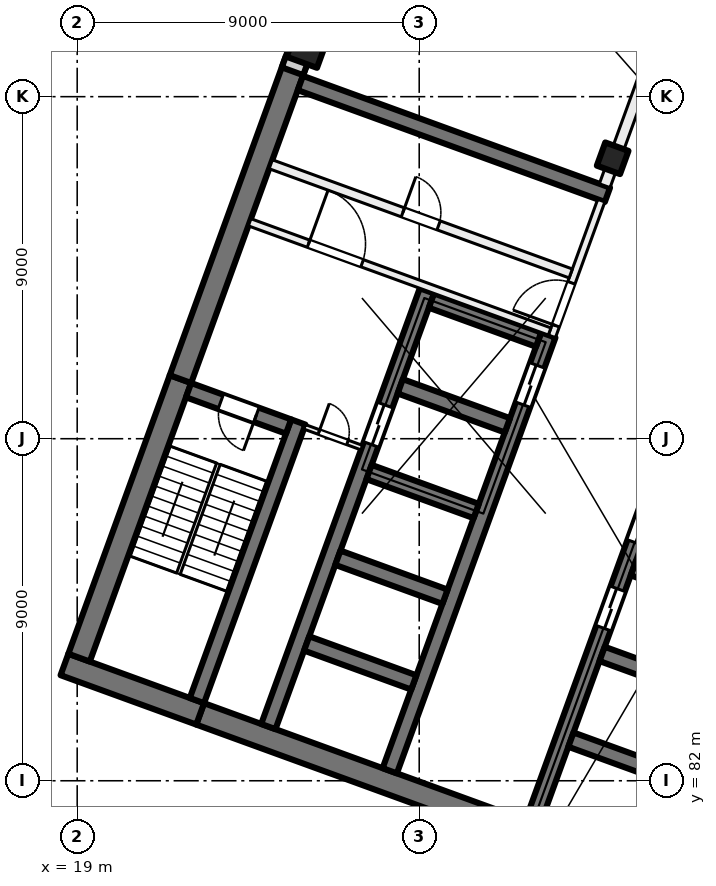
"""IFC4 building model, lengths in metres.
Left out: names, types, materials, properties, quantities, classifications, styles, units other than length and angle.
Written with IfcOpenShell. Run it as: python <this file> out.ifc"""

import sys

from ifc_helpers import new_model, si_unit, direction, frame, frame_2d, origin, origin_2d, place, context, subcontext, project, spatial, rectangle, extrude, element, fill, save


model = new_model("IFC4")
c1 = context("Model", 3, precision=1e-05, world=origin(), true_north=direction((0.0, 1.0)))
c2 = subcontext(c1, "Body", "Model", "MODEL_VIEW")
j1 = project(units=[si_unit("LENGTHUNIT", "METRE"), si_unit("PLANEANGLEUNIT", "RADIAN")], contexts=[c1])
p1 = place(None, origin())
s1 = spatial("IfcSite", under=j1, at=p1, CompositionType="ELEMENT")
p2 = place(p1, origin())
s2 = spatial("IfcBuilding", under=s1, at=p2, CompositionType="ELEMENT")
p3 = place(p2, frame((0.0, 0.0, 125.0)))
s3 = spatial("IfcBuildingStorey", under=s2, at=p3, CompositionType="ELEMENT", Elevation=125.0)
p4 = place(p3, frame((33.091, 98.379, 0.0), z_axis=(0.0, 0.0, 1.0), x_axis=(-0.342020143326, -0.939692620786, 0.0)))
e1 = element("IfcColumn", 1, at=p4, inside=s3, PredefinedType="COLUMN", context=c2, shape_type="SweptSolid", body=[
    extrude(rectangle(XDim=0.65, YDim=0.65, at=origin_2d()), origin(), (0.0, 0.0, 1.0), 4.0),
])
p5 = place(p3, frame((25.056, 101.303, 0.0), z_axis=(0.0, 0.0, 1.0), x_axis=(-0.342020143326, -0.939692620786, 0.0)))
e2 = element("IfcColumn", 2, at=p5, inside=s3, PredefinedType="COLUMN", context=c2, shape_type="SweptSolid", body=[
    extrude(rectangle(XDim=0.85, YDim=0.85, at=origin_2d()), origin(), (0.0, 0.0, 1.0), 4.0),
])
p6 = place(p3, frame((35.767, 78.835, 0.0), z_axis=(0.0, 0.0, 1.0), x_axis=(-0.939692894512, 0.342019391267, 0.0)))
e3 = element("IfcWall", 3, at=p6, inside=s3, PredefinedType="SHEAR", context=c2, shape_type="SweptSolid", body=[
    extrude(rectangle(XDim=14.4, YDim=0.6, at=frame_2d((7.2, 0.0))), origin(), (0.0, 0.0, 1.0), 4.0),
])
p7 = place(p3, frame((22.236, 83.76, 0.0), z_axis=(0.0, 0.0, 1.0), x_axis=(-0.939680822529, 0.342052557032, 0.0)))
e4 = element("IfcWall", 4, at=p7, inside=s3, PredefinedType="SHEAR", context=c2, shape_type="SweptSolid", body=[
    extrude(rectangle(XDim=3.8, YDim=0.6, at=frame_2d((1.9, 0.0))), origin(), (0.0, 0.0, 1.0), 4.0),
])
p8 = place(p3, frame((19.05, 85.239, 0.0), z_axis=(0.0, 0.0, 1.0), x_axis=(0.342016982193, 0.939693771338, 0.0)))
e5 = element("IfcWall", 5, at=p8, inside=s3, PredefinedType="SHEAR", context=c2, shape_type="SweptSolid", body=[
    extrude(rectangle(XDim=7.8, YDim=0.6, at=frame_2d((3.9, 0.0))), origin(), (0.0, 0.0, 1.0), 4.0),
])
p9 = place(p3, frame((21.717, 92.568, 0.0), z_axis=(0.0, 0.0, 1.0), x_axis=(0.342017595281, 0.939693548195, 0.0)))
e6 = element("IfcWall", 6, at=p9, inside=s3, PredefinedType="SHEAR", context=c2, shape_type="SweptSolid", body=[
    extrude(rectangle(XDim=8.925, YDim=0.6, at=frame_2d((4.462, 0.0))), origin(), (0.0, 0.0, 1.0), 4.0),
])
p10 = place(p3, frame((22.15, 84.11, 0.0), z_axis=(0.0, 0.0, 1.0), x_axis=(0.342016982193, 0.939693771338, 0.0)))
e7 = element("IfcWall", 7, at=p10, inside=s3, PredefinedType="SHEAR", context=c2, shape_type="SweptSolid", body=[
    extrude(rectangle(XDim=7.8, YDim=0.4, at=frame_2d((3.9, 0.0))), origin(), (0.0, 0.0, 1.0), 4.0),
])
p11 = place(p3, frame((24.562, 91.32, 0.0), z_axis=(0.0, 0.0, 1.0), x_axis=(-0.939717030584, 0.341953070509, 0.0)))
e8 = element("IfcWall", 8, at=p11, inside=s3, PredefinedType="SHEAR", context=c2, shape_type="SweptSolid", body=[
    extrude(rectangle(XDim=2.8, YDim=0.4, at=frame_2d((1.4, 0.0))), origin(), (0.0, 0.0, 1.0), 4.0),
])
p12 = place(p11, frame((0.9, 0.0, 0.0)))
e9 = element("IfcOpeningElement", 9, at=p12, cuts=e8, PredefinedType="OPENING", context=c2, shape_type="SweptSolid", body=[
    extrude(rectangle(XDim=1.0, YDim=2.1, at=frame_2d((0.5, 1.05))), frame((0.0, 0.21, 0.0), z_axis=(0.0, -1.0, 0.0), x_axis=(1.0, 0.0, 0.0)), (0.0, 0.0, 1.0), 0.42),
])
p13 = place(p3, frame((30.984, 80.895, 0.0), z_axis=(0.0, 0.0, 1.0), x_axis=(0.342021021735, 0.939692301071, 0.0)))
e10 = element("IfcWall", 10, at=p13, inside=s3, PredefinedType="SHEAR", context=c2, shape_type="SweptSolid", body=[
    extrude(rectangle(XDim=12.2, YDim=0.4, at=frame_2d((6.1, 0.0))), origin(), (0.0, 0.0, 1.0), 4.0),
])
p14 = place(p13, frame((5.45, 0.0, 0.0)))
e11 = element("IfcOpeningElement", 11, at=p14, cuts=e10, PredefinedType="OPENING", context=c2, shape_type="SweptSolid", body=[
    extrude(rectangle(XDim=1.1, YDim=2.1, at=frame_2d((0.55, 1.05))), frame((0.0, 0.21, 0.0), z_axis=(0.0, -1.0, 0.0), x_axis=(1.0, 0.0, 0.0)), (0.0, 0.0, 1.0), 0.42),
])
p15 = place(p13, frame((7.85, 0.0, 0.0)))
e12 = element("IfcOpeningElement", 12, at=p15, cuts=e10, PredefinedType="OPENING", context=c2, shape_type="SweptSolid", body=[
    extrude(rectangle(XDim=1.1, YDim=2.1, at=frame_2d((0.55, 1.05))), frame((0.0, 0.21, 0.0), z_axis=(0.0, -1.0, 0.0), x_axis=(1.0, 0.0, 0.0)), (0.0, 0.0, 1.0), 0.42),
])
p16 = place(p13, frame((10.25, 0.0, 0.0)))
e13 = element("IfcOpeningElement", 13, at=p16, cuts=e10, PredefinedType="OPENING", context=c2, shape_type="SweptSolid", body=[
    extrude(rectangle(XDim=1.1, YDim=2.1, at=frame_2d((0.55, 1.05))), frame((0.0, 0.21, 0.0), z_axis=(0.0, -1.0, 0.0), x_axis=(1.0, 0.0, 0.0)), (0.0, 0.0, 1.0), 0.42),
])
for number, where, z_axis, x_axis in (
    (14, (34.812, 82.056, 0.0), (0.0, 0.0, 1.0), (-0.94, 0.342, 0.0)),
    (15, (35.632, 84.311, 0.0), (0.0, 0.0, 1.0), (-0.94, 0.342, 0.0)),
    (16, (36.453, 86.566, 0.0), (0.0, 0.0, 1.0), (-0.94, 0.342, 0.0)),
):
    element("IfcWall", number, at=place(p3, frame(where, z_axis=z_axis, x_axis=x_axis)), inside=s3, PredefinedType="SHEAR", context=c2, shape_type="SweptSolid", body=[
        extrude(rectangle(XDim=3.0, YDim=0.4, at=frame_2d((1.5, 0.0))), origin(), (0.0, 0.0, 1.0), 4.0),
    ])
p17 = place(p3, frame((27.225, 82.263, 0.0), z_axis=(0.0, 0.0, 1.0), x_axis=(0.342014590177, 0.939694641948, 0.0)))
e17 = element("IfcWall", 17, at=p17, inside=s3, PredefinedType="SHEAR", context=c2, shape_type="SweptSolid", body=[
    extrude(rectangle(XDim=12.2, YDim=0.4, at=frame_2d((6.1, 0.0))), origin(), (0.0, 0.0, 1.0), 4.0),
])
p18 = place(p17, frame((10.25, 0.0, 0.0)))
e18 = element("IfcOpeningElement", 18, at=p18, cuts=e17, PredefinedType="OPENING", context=c2, shape_type="SweptSolid", body=[
    extrude(rectangle(XDim=1.1, YDim=2.1, at=frame_2d((0.55, 1.05))), frame((0.0, 0.21, 0.0), z_axis=(0.0, -1.0, 0.0), x_axis=(1.0, 0.0, 0.0)), (0.0, 0.0, 1.0), 0.42),
])
p19 = place(p3, frame((24.03, 83.426, 0.0), z_axis=(0.0, 0.0, 1.0), x_axis=(0.342014590177, 0.939694641948, 0.0)))
e19 = element("IfcWall", 19, at=p19, inside=s3, PredefinedType="SHEAR", context=c2, shape_type="SweptSolid", body=[
    extrude(rectangle(XDim=12.2, YDim=0.4, at=frame_2d((6.1, 0.0))), origin(), (0.0, 0.0, 1.0), 4.0),
])
p20 = place(p19, frame((7.9, 0.0, 0.0)))
e20 = element("IfcOpeningElement", 20, at=p20, cuts=e19, PredefinedType="OPENING", context=c2, shape_type="SweptSolid", body=[
    extrude(rectangle(XDim=1.1, YDim=2.1, at=frame_2d((0.55, 1.05))), frame((0.0, 0.21, 0.0), z_axis=(0.0, -1.0, 0.0), x_axis=(1.0, 0.0, 0.0)), (0.0, 0.0, 1.0), 0.42),
])
p21 = place(p3, frame((27.858, 84.587, 0.0), z_axis=(0.0, 0.0, 1.0), x_axis=(-0.939686455819, 0.342037080957, 0.0)))
e21 = element("IfcWall", 21, at=p21, inside=s3, PredefinedType="SHEAR", context=c2, shape_type="SweptSolid", body=[
    extrude(rectangle(XDim=3.0, YDim=0.4, at=frame_2d((1.5, 0.0))), origin(), (0.0, 0.0, 1.0), 4.0),
])
p22 = place(p3, frame((28.678, 86.842, 0.0), z_axis=(0.0, 0.0, 1.0), x_axis=(-0.939676934218, 0.342063238742, 0.0)))
e22 = element("IfcWall", 22, at=p22, inside=s3, PredefinedType="SHEAR", context=c2, shape_type="SweptSolid", body=[
    extrude(rectangle(XDim=3.0, YDim=0.4, at=frame_2d((1.5, 0.0))), origin(), (0.0, 0.0, 1.0), 4.0),
])
for number, where, z_axis, x_axis in (
    (23, (29.5, 89.097, 0.0), (0.0, 0.0, 1.0), (-0.94, 0.342, 0.0)),
    (24, (30.32, 91.353, 0.0), (0.0, 0.0, 1.0), (-0.94, 0.342, 0.0)),
    (25, (31.141, 93.608, 0.0), (0.0, 0.0, 1.0), (-0.94, 0.342, 0.0)),
):
    element("IfcWall", number, at=place(p3, frame(where, z_axis=z_axis, x_axis=x_axis)), inside=s3, PredefinedType="SHEAR", context=c2, shape_type="SweptSolid", body=[
        extrude(rectangle(XDim=3.0, YDim=0.4, at=frame_2d((1.5, 0.0))), origin(), (0.0, 0.0, 1.0), 4.0),
    ])
p23 = place(p3, frame((32.953, 97.418, 0.0), z_axis=(0.0, 0.0, 1.0), x_axis=(-0.93969060187, 0.342025690201, 0.0)))
e26 = element("IfcWall", 26, at=p23, inside=s3, PredefinedType="SHEAR", context=c2, shape_type="SweptSolid", body=[
    extrude(rectangle(XDim=8.6, YDim=0.4, at=frame_2d((4.3, 0.0))), origin(), (0.0, 0.0, 1.0), 4.0),
])
p24 = place(p3, frame((24.666, 100.669, 0.0), z_axis=(0.0, 0.0, 1.0), x_axis=(0.34201964167, 0.939692803373, 0.0)))
e27 = element("IfcWall", 27, at=p24, inside=s3, PredefinedType="SOLIDWALL", context=c2, shape_type="SweptSolid", body=[
    extrude(rectangle(XDim=32.884, YDim=0.6, at=frame_2d((16.442, 0.0))), origin(), (0.0, 0.0, 1.0), 3.625),
])
p25 = place(p24, frame((1.48, 0.0, 0.9)))
e28 = element("IfcOpeningElement", 28, at=p25, cuts=e27, PredefinedType="OPENING", context=c2, shape_type="SweptSolid", body=[
    extrude(rectangle(XDim=3.0, YDim=2.4, at=frame_2d((1.5, 1.2))), frame((0.0, 0.31, 0.0), z_axis=(0.0, -1.0, 0.0), x_axis=(1.0, 0.0, 0.0)), (0.0, 0.0, 1.0), 0.62),
])
p26 = place(p24, frame((5.98, 0.0, 0.9)))
e29 = element("IfcOpeningElement", 29, at=p26, cuts=e27, PredefinedType="OPENING", context=c2, shape_type="SweptSolid", body=[
    extrude(rectangle(XDim=3.0, YDim=2.4, at=frame_2d((1.5, 1.2))), frame((0.0, 0.31, 0.0), z_axis=(0.0, -1.0, 0.0), x_axis=(1.0, 0.0, 0.0)), (0.0, 0.0, 1.0), 0.62),
])
p27 = place(p24, frame((10.48, 0.0, 0.9)))
e30 = element("IfcOpeningElement", 30, at=p27, cuts=e27, PredefinedType="OPENING", context=c2, shape_type="SweptSolid", body=[
    extrude(rectangle(XDim=3.0, YDim=2.4, at=frame_2d((1.5, 1.2))), frame((0.0, 0.31, 0.0), z_axis=(0.0, -1.0, 0.0), x_axis=(1.0, 0.0, 0.0)), (0.0, 0.0, 1.0), 0.62),
])
p28 = place(p24, frame((14.98, 0.0, 0.9)))
e31 = element("IfcOpeningElement", 31, at=p28, cuts=e27, PredefinedType="OPENING", context=c2, shape_type="SweptSolid", body=[
    extrude(rectangle(XDim=3.0, YDim=2.4, at=frame_2d((1.5, 1.2))), frame((0.0, 0.31, 0.0), z_axis=(0.0, -1.0, 0.0), x_axis=(1.0, 0.0, 0.0)), (0.0, 0.0, 1.0), 0.62),
])
p29 = place(p24, frame((19.48, 0.0, 0.9)))
e32 = element("IfcOpeningElement", 32, at=p29, cuts=e27, PredefinedType="OPENING", context=c2, shape_type="SweptSolid", body=[
    extrude(rectangle(XDim=3.0, YDim=2.4, at=frame_2d((1.5, 1.2))), frame((0.0, 0.31, 0.0), z_axis=(0.0, -1.0, 0.0), x_axis=(1.0, 0.0, 0.0)), (0.0, 0.0, 1.0), 0.62),
])
p30 = place(p24, frame((23.98, 0.0, 0.9)))
e33 = element("IfcOpeningElement", 33, at=p30, cuts=e27, PredefinedType="OPENING", context=c2, shape_type="SweptSolid", body=[
    extrude(rectangle(XDim=3.0, YDim=2.4, at=frame_2d((1.5, 1.2))), frame((0.0, 0.31, 0.0), z_axis=(0.0, -1.0, 0.0), x_axis=(1.0, 0.0, 0.0)), (0.0, 0.0, 1.0), 0.62),
])
p31 = place(p24, frame((28.48, 0.0, 0.9)))
e34 = element("IfcOpeningElement", 34, at=p31, cuts=e27, PredefinedType="OPENING", context=c2, shape_type="SweptSolid", body=[
    extrude(rectangle(XDim=3.0, YDim=2.4, at=frame_2d((1.5, 1.2))), frame((0.0, 0.31, 0.0), z_axis=(0.0, -1.0, 0.0), x_axis=(1.0, 0.0, 0.0)), (0.0, 0.0, 1.0), 0.62),
])
p32 = place(p3, frame((31.491, 93.693, 0.0), z_axis=(0.0, 0.0, 1.0), x_axis=(0.341995824804, 0.939701471648, 0.0)))
e35 = element("IfcWall", 35, at=p32, inside=s3, PredefinedType="PARTITIONING", context=c2, shape_type="SweptSolid", body=[
    extrude(rectangle(XDim=3.8, YDim=0.2, at=frame_2d((1.9, 0.0))), origin(), (0.0, 0.0, 1.0), 3.625),
])
p33 = place(p32, frame((0.3, 0.0, 0.0)))
e36 = element("IfcOpeningElement", 36, at=p33, cuts=e35, PredefinedType="OPENING", context=c2, shape_type="SweptSolid", body=[
    extrude(rectangle(XDim=1.2, YDim=2.1, at=frame_2d((0.6, 1.05))), frame((0.0, 0.11, 0.0), z_axis=(0.0, -1.0, 0.0), x_axis=(1.0, 0.0, 0.0)), (0.0, 0.0, 1.0), 0.22),
])
p34 = place(p3, frame((23.538, 96.694, 0.0), z_axis=(0.0, 0.0, 1.0), x_axis=(0.939691552312, -0.342023078919, 0.0)))
e37 = element("IfcWall", 37, at=p34, inside=s3, PredefinedType="PARTITIONING", context=c2, shape_type="SweptSolid", body=[
    extrude(rectangle(XDim=8.4, YDim=0.2, at=frame_2d((4.2, 0.0))), origin(), (0.0, 0.0, 1.0), 3.625),
])
p35 = place(p34, frame((1.65, 0.0, 0.0)))
e38 = element("IfcOpeningElement", 38, at=p35, cuts=e37, PredefinedType="OPENING", context=c2, shape_type="SweptSolid", body=[
    extrude(rectangle(XDim=1.5, YDim=2.1, at=frame_2d((0.75, 1.05))), frame((0.0, 0.11, 0.0), z_axis=(0.0, -1.0, 0.0), x_axis=(1.0, 0.0, 0.0)), (0.0, 0.0, 1.0), 0.22),
])
p36 = place(p3, frame((24.094, 98.221, 0.0), z_axis=(0.0, 0.0, 1.0), x_axis=(0.939691552312, -0.342023078919, 0.0)))
e39 = element("IfcWall", 39, at=p36, inside=s3, PredefinedType="PARTITIONING", context=c2, shape_type="SweptSolid", body=[
    extrude(rectangle(XDim=8.4, YDim=0.25, at=frame_2d((4.2, 0.0))), origin(), (0.0, 0.0, 1.0), 3.625),
])
p37 = place(p36, frame((3.7, 0.0, 0.0)))
e40 = element("IfcOpeningElement", 40, at=p37, cuts=e39, PredefinedType="OPENING", context=c2, shape_type="SweptSolid", body=[
    extrude(rectangle(XDim=1.0, YDim=2.1, at=frame_2d((0.5, 1.05))), frame((0.0, 0.135, 0.0), z_axis=(0.0, -1.0, 0.0), x_axis=(1.0, 0.0, 0.0)), (0.0, 0.0, 1.0), 0.27),
])
p38 = place(p3, frame((24.985, 91.312, 0.0), z_axis=(0.0, 0.0, 1.0), x_axis=(0.939708740826, -0.341975850632, 0.0)))
e41 = element("IfcWall", 41, at=p38, inside=s3, PredefinedType="PARTITIONING", context=c2, shape_type="SweptSolid", body=[
    extrude(rectangle(XDim=1.6, YDim=0.125, at=frame_2d((0.8, 0.0))), origin(), (0.0, 0.0, 1.0), 3.625),
])
p39 = place(p38, frame((0.4, 0.0, 0.0)))
e42 = element("IfcOpeningElement", 42, at=p39, cuts=e41, PredefinedType="OPENING", context=c2, shape_type="SweptSolid", body=[
    extrude(rectangle(XDim=0.8, YDim=2.1, at=frame_2d((0.4, 1.05))), frame((0.0, 0.073, 0.0), z_axis=(0.0, -1.0, 0.0), x_axis=(1.0, 0.0, 0.0)), (0.0, 0.0, 1.0), 0.145),
])
p40 = place(p3, frame((32.881, 97.657, 0.0), z_axis=(0.0, 0.0, 1.0), x_axis=(0.342017360004, 0.939693633828, 0.0)))
e43 = element("IfcWall", 43, at=p40, inside=s3, PredefinedType="PARTITIONING", context=c2, shape_type="SweptSolid", body=[
    extrude(rectangle(XDim=34.516, YDim=0.3, at=frame_2d((17.258, 0.0))), origin(), (0.0, 0.0, 1.0), 3.625),
])
p41 = place(p40, frame((4.275, 0.0, 0.0)))
e44 = element("IfcOpeningElement", 44, at=p41, cuts=e43, PredefinedType="OPENING", context=c2, shape_type="SweptSolid", body=[
    extrude(rectangle(XDim=1.2, YDim=2.1, at=frame_2d((0.6, 1.05))), frame((0.0, 0.16, 0.0), z_axis=(0.0, -1.0, 0.0), x_axis=(1.0, 0.0, 0.0)), (0.0, 0.0, 1.0), 0.32),
])
p42 = place(p40, frame((10.75, 0.0, 0.0)))
e45 = element("IfcOpeningElement", 45, at=p42, cuts=e43, PredefinedType="OPENING", context=c2, shape_type="SweptSolid", body=[
    extrude(rectangle(XDim=1.0, YDim=2.1, at=frame_2d((0.5, 1.05))), frame((0.0, 0.16, 0.0), z_axis=(0.0, -1.0, 0.0), x_axis=(1.0, 0.0, 0.0)), (0.0, 0.0, 1.0), 0.32),
])
p43 = place(p40, frame((15.25, 0.0, 0.0)))
e46 = element("IfcOpeningElement", 46, at=p43, cuts=e43, PredefinedType="OPENING", context=c2, shape_type="SweptSolid", body=[
    extrude(rectangle(XDim=1.0, YDim=2.1, at=frame_2d((0.5, 1.05))), frame((0.0, 0.16, 0.0), z_axis=(0.0, -1.0, 0.0), x_axis=(1.0, 0.0, 0.0)), (0.0, 0.0, 1.0), 0.32),
])
p44 = place(p40, frame((20.4, 0.0, 0.0)))
e47 = element("IfcOpeningElement", 47, at=p44, cuts=e43, PredefinedType="OPENING", context=c2, shape_type="SweptSolid", body=[
    extrude(rectangle(XDim=1.2, YDim=2.1, at=frame_2d((0.6, 1.05))), frame((0.0, 0.16, 0.0), z_axis=(0.0, -1.0, 0.0), x_axis=(1.0, 0.0, 0.0)), (0.0, 0.0, 1.0), 0.32),
])
p45 = place(p40, frame((25.0, 0.0, 0.0)))
e48 = element("IfcOpeningElement", 48, at=p45, cuts=e43, PredefinedType="OPENING", context=c2, shape_type="SweptSolid", body=[
    extrude(rectangle(XDim=1.0, YDim=2.1, at=frame_2d((0.5, 1.05))), frame((0.0, 0.16, 0.0), z_axis=(0.0, -1.0, 0.0), x_axis=(1.0, 0.0, 0.0)), (0.0, 0.0, 1.0), 0.32),
])
p46 = place(p18, origin())
e49 = element("IfcDoor", 49, at=p46, inside=s3, OperationType="DOUBLE_DOOR_SLIDING", PredefinedType="DOOR", context=c2, shape_type="SweptSolid", body=[
    extrude(rectangle(XDim=1.1, YDim=2.1, at=frame_2d((0.55, 1.05))), frame((0.0, 0.025, 0.0), z_axis=(0.0, -1.0, 0.0), x_axis=(1.0, 0.0, 0.0)), (0.0, 0.0, 1.0), 0.05),
])
fill(e18, e49)
p47 = place(p14, origin())
e50 = element("IfcDoor", 50, at=p47, inside=s3, OperationType="DOUBLE_DOOR_SLIDING", PredefinedType="DOOR", context=c2, shape_type="SweptSolid", body=[
    extrude(rectangle(XDim=1.1, YDim=2.1, at=frame_2d((0.55, 1.05))), frame((0.0, 0.025, 0.0), z_axis=(0.0, -1.0, 0.0), x_axis=(1.0, 0.0, 0.0)), (0.0, 0.0, 1.0), 0.05),
])
fill(e11, e50)
p48 = place(p15, origin())
e51 = element("IfcDoor", 51, at=p48, inside=s3, OperationType="DOUBLE_DOOR_SLIDING", PredefinedType="DOOR", context=c2, shape_type="SweptSolid", body=[
    extrude(rectangle(XDim=1.1, YDim=2.1, at=frame_2d((0.55, 1.05))), frame((0.0, 0.025, 0.0), z_axis=(0.0, -1.0, 0.0), x_axis=(1.0, 0.0, 0.0)), (0.0, 0.0, 1.0), 0.05),
])
fill(e12, e51)
p49 = place(p33, origin())
e52 = element("IfcDoor", 52, at=p49, inside=s3, OperationType="DOUBLE_DOOR_SINGLE_SWING", PredefinedType="DOOR", context=c2, shape_type="SweptSolid", body=[
    extrude(rectangle(XDim=1.2, YDim=2.1, at=frame_2d((0.6, 1.05))), frame((0.0, 0.025, 0.0), z_axis=(0.0, -1.0, 0.0), x_axis=(1.0, 0.0, 0.0)), (0.0, 0.0, 1.0), 0.05),
])
fill(e36, e52)
p50 = place(p35, origin())
e53 = element("IfcDoor", 53, at=p50, inside=s3, OperationType="DOUBLE_DOOR_SINGLE_SWING", PredefinedType="DOOR", context=c2, shape_type="SweptSolid", body=[
    extrude(rectangle(XDim=1.5, YDim=2.1, at=frame_2d((0.75, 1.05))), frame((0.0, 0.025, 0.0), z_axis=(0.0, -1.0, 0.0), x_axis=(1.0, 0.0, 0.0)), (0.0, 0.0, 1.0), 0.05),
])
fill(e38, e53)
p51 = place(p12, origin())
e54 = element("IfcDoor", 54, at=p51, inside=s3, OperationType="SINGLE_SWING_LEFT", PredefinedType="DOOR", context=c2, shape_type="SweptSolid", body=[
    extrude(rectangle(XDim=1.0, YDim=2.1, at=frame_2d((0.5, 1.05))), frame((0.0, 0.025, 0.0), z_axis=(0.0, -1.0, 0.0), x_axis=(1.0, 0.0, 0.0)), (0.0, 0.0, 1.0), 0.05),
])
fill(e9, e54)
p52 = place(p39, origin())
e55 = element("IfcDoor", 55, at=p52, inside=s3, OperationType="SINGLE_SWING_RIGHT", PredefinedType="DOOR", context=c2, shape_type="SweptSolid", body=[
    extrude(rectangle(XDim=0.8, YDim=2.1, at=frame_2d((0.4, 1.05))), frame((0.0, 0.025, 0.0), z_axis=(0.0, -1.0, 0.0), x_axis=(1.0, 0.0, 0.0)), (0.0, 0.0, 1.0), 0.05),
])
fill(e42, e55)
p53 = place(p37, origin())
e56 = element("IfcDoor", 56, at=p53, inside=s3, OperationType="SINGLE_SWING_LEFT", PredefinedType="DOOR", context=c2, shape_type="SweptSolid", body=[
    extrude(rectangle(XDim=1.0, YDim=2.1, at=frame_2d((0.5, 1.05))), frame((0.0, 0.025, 0.0), z_axis=(0.0, -1.0, 0.0), x_axis=(1.0, 0.0, 0.0)), (0.0, 0.0, 1.0), 0.05),
])
fill(e40, e56)
p54 = place(p20, origin())
e57 = element("IfcDoor", 57, at=p54, inside=s3, OperationType="DOUBLE_DOOR_SLIDING", PredefinedType="DOOR", context=c2, shape_type="SweptSolid", body=[
    extrude(rectangle(XDim=1.1, YDim=2.1, at=frame_2d((0.55, 1.05))), frame((0.0, 0.025, 0.0), z_axis=(0.0, -1.0, 0.0), x_axis=(1.0, 0.0, 0.0)), (0.0, 0.0, 1.0), 0.05),
])
fill(e20, e57)
save(model, sys.argv[1])
